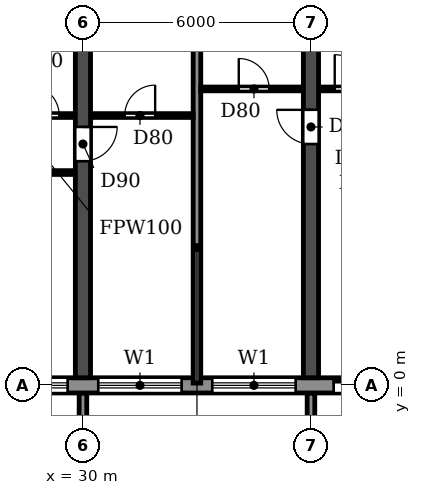
"""IFC4 building model, lengths in metres.
Left out: names, types, materials, properties, quantities, classifications, styles, units other than length and angle.
Written with IfcOpenShell. Run it as: python <this file> out.ifc"""

import sys

from ifc_helpers import new_model, si_unit, direction, frame, frame_2d, origin, place, context, subcontext, project, spatial, polyline, rectangle, outline, extrude, source, transform, mapped, element, fill, save


model = new_model("IFC4")
c1 = context("Model", 3, precision=1e-05, world=origin(), true_north=direction((0.0, 1.0)))
c2 = subcontext(c1, "Body", "Model", "MODEL_VIEW")
j1 = project(units=[si_unit("LENGTHUNIT", "METRE"), si_unit("PLANEANGLEUNIT", "RADIAN")], contexts=[c1])
p1 = place(None, origin())
s1 = spatial("IfcSite", under=j1, at=p1, CompositionType="ELEMENT")
p2 = place(p1, origin())
s2 = spatial("IfcBuilding", under=s1, at=p2, CompositionType="ELEMENT")
p3 = place(p2, frame((0.0, 0.0, 26.7)))
s3 = spatial("IfcBuildingStorey", under=s2, at=p3, CompositionType="ELEMENT", Elevation=26.7)
p4 = place(p3, frame((30.0, 0.2, 0.0), z_axis=(0.0, 0.0, 1.0), x_axis=(0.0, 1.0, 0.0)))
e1 = element("IfcWall", 1, at=p4, inside=s3, PredefinedType="SHEAR", context=c2, shape_type="SweptSolid", body=[
    extrude(rectangle(XDim=11.65, YDim=0.4, at=frame_2d((5.825, 0.0))), origin(), (0.0, 0.0, 1.0), 3.05),
])
p5 = place(p4, frame((5.7, 0.0, 0.0)))
e2 = element("IfcOpeningElement", 2, at=p5, cuts=e1, PredefinedType="OPENING", context=c2, shape_type="SweptSolid", body=[
    extrude(rectangle(XDim=0.9, YDim=2.1, at=frame_2d((0.45, 1.05))), frame((0.0, 0.21, 0.0), z_axis=(0.0, -1.0, 0.0), x_axis=(1.0, 0.0, 0.0)), (0.0, 0.0, 1.0), 0.42),
])
p6 = place(p3, frame((36.0, 0.2, 0.0), z_axis=(0.0, 0.0, 1.0), x_axis=(0.0, 1.0, 0.0)))
e3 = element("IfcWall", 3, at=p6, inside=s3, PredefinedType="SHEAR", context=c2, shape_type="SweptSolid", body=[
    extrude(rectangle(XDim=11.65, YDim=0.4, at=frame_2d((5.825, 0.0))), origin(), (0.0, 0.0, 1.0), 3.05),
])
p7 = place(p6, frame((6.15, 0.0, 0.0)))
e4 = element("IfcOpeningElement", 4, at=p7, cuts=e3, PredefinedType="OPENING", context=c2, shape_type="SweptSolid", body=[
    extrude(rectangle(XDim=0.9, YDim=2.1, at=frame_2d((0.45, 1.05))), frame((0.0, 0.21, 0.0), z_axis=(0.0, -1.0, 0.0), x_axis=(1.0, 0.0, 0.0)), (0.0, 0.0, 1.0), 0.42),
])
p8 = place(p3, frame((4.683, 0.0, 0.0), z_axis=(0.0, 0.0, 1.0), x_axis=(1.0, 0.0, 0.0)))
e5 = element("IfcWall", 5, at=p8, inside=s3, PredefinedType="STANDARD", context=c2, shape_type="SweptSolid", body=[
    extrude(rectangle(XDim=92.634, YDim=0.4, at=frame_2d((46.317, 0.0))), origin(), (0.0, 0.0, 1.0), 3.05),
])
p9 = place(p8, frame((1.717, 0.0, 0.9)))
e6 = element("IfcOpeningElement", 6, at=p9, cuts=e5, PredefinedType="OPENING", context=c2, shape_type="SweptSolid", body=[
    extrude(rectangle(XDim=2.2, YDim=1.5, at=frame_2d((1.1, 0.75))), frame((0.0, 0.21, 0.0), z_axis=(0.0, -1.0, 0.0), x_axis=(1.0, 0.0, 0.0)), (0.0, 0.0, 1.0), 0.42),
])
p10 = place(p8, frame((4.717, 0.0, 0.9)))
e7 = element("IfcOpeningElement", 7, at=p10, cuts=e5, PredefinedType="OPENING", context=c2, shape_type="SweptSolid", body=[
    extrude(rectangle(XDim=2.2, YDim=1.5, at=frame_2d((1.1, 0.75))), frame((0.0, 0.21, 0.0), z_axis=(0.0, -1.0, 0.0), x_axis=(1.0, 0.0, 0.0)), (0.0, 0.0, 1.0), 0.42),
])
p11 = place(p8, frame((7.717, 0.0, 0.9)))
e8 = element("IfcOpeningElement", 8, at=p11, cuts=e5, PredefinedType="OPENING", context=c2, shape_type="SweptSolid", body=[
    extrude(rectangle(XDim=2.2, YDim=1.5, at=frame_2d((1.1, 0.75))), frame((0.0, 0.21, 0.0), z_axis=(0.0, -1.0, 0.0), x_axis=(1.0, 0.0, 0.0)), (0.0, 0.0, 1.0), 0.42),
])
p12 = place(p8, frame((10.717, 0.0, 0.9)))
e9 = element("IfcOpeningElement", 9, at=p12, cuts=e5, PredefinedType="OPENING", context=c2, shape_type="SweptSolid", body=[
    extrude(rectangle(XDim=2.2, YDim=1.5, at=frame_2d((1.1, 0.75))), frame((0.0, 0.21, 0.0), z_axis=(0.0, -1.0, 0.0), x_axis=(1.0, 0.0, 0.0)), (0.0, 0.0, 1.0), 0.42),
])
p13 = place(p8, frame((13.717, 0.0, 0.9)))
e10 = element("IfcOpeningElement", 10, at=p13, cuts=e5, PredefinedType="OPENING", context=c2, shape_type="SweptSolid", body=[
    extrude(rectangle(XDim=2.2, YDim=1.5, at=frame_2d((1.1, 0.75))), frame((0.0, 0.21, 0.0), z_axis=(0.0, -1.0, 0.0), x_axis=(1.0, 0.0, 0.0)), (0.0, 0.0, 1.0), 0.42),
])
p14 = place(p8, frame((16.717, 0.0, 0.9)))
e11 = element("IfcOpeningElement", 11, at=p14, cuts=e5, PredefinedType="OPENING", context=c2, shape_type="SweptSolid", body=[
    extrude(rectangle(XDim=2.2, YDim=1.5, at=frame_2d((1.1, 0.75))), frame((0.0, 0.21, 0.0), z_axis=(0.0, -1.0, 0.0), x_axis=(1.0, 0.0, 0.0)), (0.0, 0.0, 1.0), 0.42),
])
p15 = place(p8, frame((19.917, 0.0, 0.0)))
e12 = element("IfcOpeningElement", 12, at=p15, cuts=e5, PredefinedType="OPENING", context=c2, shape_type="SweptSolid", body=[
    extrude(rectangle(XDim=1.8, YDim=2.4, at=frame_2d((0.9, 1.2))), frame((0.0, 0.21, 0.0), z_axis=(0.0, -1.0, 0.0), x_axis=(1.0, 0.0, 0.0)), (0.0, 0.0, 1.0), 0.42),
])
p16 = place(p8, frame((22.717, 0.0, 0.9)))
e13 = element("IfcOpeningElement", 13, at=p16, cuts=e5, PredefinedType="OPENING", context=c2, shape_type="SweptSolid", body=[
    extrude(rectangle(XDim=2.2, YDim=1.5, at=frame_2d((1.1, 0.75))), frame((0.0, 0.21, 0.0), z_axis=(0.0, -1.0, 0.0), x_axis=(1.0, 0.0, 0.0)), (0.0, 0.0, 1.0), 0.42),
])
p17 = place(p8, frame((25.717, 0.0, 0.9)))
e14 = element("IfcOpeningElement", 14, at=p17, cuts=e5, PredefinedType="OPENING", context=c2, shape_type="SweptSolid", body=[
    extrude(rectangle(XDim=2.2, YDim=1.5, at=frame_2d((1.1, 0.75))), frame((0.0, 0.21, 0.0), z_axis=(0.0, -1.0, 0.0), x_axis=(1.0, 0.0, 0.0)), (0.0, 0.0, 1.0), 0.42),
])
p18 = place(p8, frame((28.717, 0.0, 0.9)))
e15 = element("IfcOpeningElement", 15, at=p18, cuts=e5, PredefinedType="OPENING", context=c2, shape_type="SweptSolid", body=[
    extrude(rectangle(XDim=2.2, YDim=1.5, at=frame_2d((1.1, 0.75))), frame((0.0, 0.21, 0.0), z_axis=(0.0, -1.0, 0.0), x_axis=(1.0, 0.0, 0.0)), (0.0, 0.0, 1.0), 0.42),
])
p19 = place(p8, frame((31.917, 0.0, 0.0)))
e16 = element("IfcOpeningElement", 16, at=p19, cuts=e5, PredefinedType="OPENING", context=c2, shape_type="SweptSolid", body=[
    extrude(rectangle(XDim=1.8, YDim=2.4, at=frame_2d((0.9, 1.2))), frame((0.0, 0.21, 0.0), z_axis=(0.0, -1.0, 0.0), x_axis=(1.0, 0.0, 0.0)), (0.0, 0.0, 1.0), 0.42),
])
p20 = place(p8, frame((34.717, 0.0, 0.9)))
e17 = element("IfcOpeningElement", 17, at=p20, cuts=e5, PredefinedType="OPENING", context=c2, shape_type="SweptSolid", body=[
    extrude(rectangle(XDim=2.2, YDim=1.5, at=frame_2d((1.1, 0.75))), frame((0.0, 0.21, 0.0), z_axis=(0.0, -1.0, 0.0), x_axis=(1.0, 0.0, 0.0)), (0.0, 0.0, 1.0), 0.42),
])
p21 = place(p8, frame((37.717, 0.0, 0.9)))
e18 = element("IfcOpeningElement", 18, at=p21, cuts=e5, PredefinedType="OPENING", context=c2, shape_type="SweptSolid", body=[
    extrude(rectangle(XDim=2.2, YDim=1.5, at=frame_2d((1.1, 0.75))), frame((0.0, 0.21, 0.0), z_axis=(0.0, -1.0, 0.0), x_axis=(1.0, 0.0, 0.0)), (0.0, 0.0, 1.0), 0.42),
])
p22 = place(p8, frame((40.717, 0.0, 0.9)))
e19 = element("IfcOpeningElement", 19, at=p22, cuts=e5, PredefinedType="OPENING", context=c2, shape_type="SweptSolid", body=[
    extrude(rectangle(XDim=2.2, YDim=1.5, at=frame_2d((1.1, 0.75))), frame((0.0, 0.21, 0.0), z_axis=(0.0, -1.0, 0.0), x_axis=(1.0, 0.0, 0.0)), (0.0, 0.0, 1.0), 0.42),
])
p23 = place(p8, frame((43.917, 0.0, 0.0)))
e20 = element("IfcOpeningElement", 20, at=p23, cuts=e5, PredefinedType="OPENING", context=c2, shape_type="SweptSolid", body=[
    extrude(rectangle(XDim=1.8, YDim=2.4, at=frame_2d((0.9, 1.2))), frame((0.0, 0.21, 0.0), z_axis=(0.0, -1.0, 0.0), x_axis=(1.0, 0.0, 0.0)), (0.0, 0.0, 1.0), 0.42),
])
p24 = place(p8, frame((46.717, 0.0, 0.9)))
e21 = element("IfcOpeningElement", 21, at=p24, cuts=e5, PredefinedType="OPENING", context=c2, shape_type="SweptSolid", body=[
    extrude(rectangle(XDim=2.2, YDim=1.5, at=frame_2d((1.1, 0.75))), frame((0.0, 0.21, 0.0), z_axis=(0.0, -1.0, 0.0), x_axis=(1.0, 0.0, 0.0)), (0.0, 0.0, 1.0), 0.42),
])
p25 = place(p8, frame((49.717, 0.0, 0.9)))
e22 = element("IfcOpeningElement", 22, at=p25, cuts=e5, PredefinedType="OPENING", context=c2, shape_type="SweptSolid", body=[
    extrude(rectangle(XDim=2.2, YDim=1.5, at=frame_2d((1.1, 0.75))), frame((0.0, 0.21, 0.0), z_axis=(0.0, -1.0, 0.0), x_axis=(1.0, 0.0, 0.0)), (0.0, 0.0, 1.0), 0.42),
])
p26 = place(p8, frame((52.717, 0.0, 0.9)))
e23 = element("IfcOpeningElement", 23, at=p26, cuts=e5, PredefinedType="OPENING", context=c2, shape_type="SweptSolid", body=[
    extrude(rectangle(XDim=2.2, YDim=1.5, at=frame_2d((1.1, 0.75))), frame((0.0, 0.21, 0.0), z_axis=(0.0, -1.0, 0.0), x_axis=(1.0, 0.0, 0.0)), (0.0, 0.0, 1.0), 0.42),
])
p27 = place(p8, frame((55.717, 0.0, 0.9)))
e24 = element("IfcOpeningElement", 24, at=p27, cuts=e5, PredefinedType="OPENING", context=c2, shape_type="SweptSolid", body=[
    extrude(rectangle(XDim=2.2, YDim=1.5, at=frame_2d((1.1, 0.75))), frame((0.0, 0.21, 0.0), z_axis=(0.0, -1.0, 0.0), x_axis=(1.0, 0.0, 0.0)), (0.0, 0.0, 1.0), 0.42),
])
p28 = place(p8, frame((58.917, 0.0, 0.0)))
e25 = element("IfcOpeningElement", 25, at=p28, cuts=e5, PredefinedType="OPENING", context=c2, shape_type="SweptSolid", body=[
    extrude(rectangle(XDim=1.8, YDim=2.4, at=frame_2d((0.9, 1.2))), frame((0.0, 0.21, 0.0), z_axis=(0.0, -1.0, 0.0), x_axis=(1.0, 0.0, 0.0)), (0.0, 0.0, 1.0), 0.42),
])
p29 = place(p8, frame((61.717, 0.0, 0.9)))
e26 = element("IfcOpeningElement", 26, at=p29, cuts=e5, PredefinedType="OPENING", context=c2, shape_type="SweptSolid", body=[
    extrude(rectangle(XDim=2.2, YDim=1.5, at=frame_2d((1.1, 0.75))), frame((0.0, 0.21, 0.0), z_axis=(0.0, -1.0, 0.0), x_axis=(1.0, 0.0, 0.0)), (0.0, 0.0, 1.0), 0.42),
])
p30 = place(p8, frame((64.717, 0.0, 0.9)))
e27 = element("IfcOpeningElement", 27, at=p30, cuts=e5, PredefinedType="OPENING", context=c2, shape_type="SweptSolid", body=[
    extrude(rectangle(XDim=2.2, YDim=1.5, at=frame_2d((1.1, 0.75))), frame((0.0, 0.21, 0.0), z_axis=(0.0, -1.0, 0.0), x_axis=(1.0, 0.0, 0.0)), (0.0, 0.0, 1.0), 0.42),
])
p31 = place(p8, frame((67.717, 0.0, 0.9)))
e28 = element("IfcOpeningElement", 28, at=p31, cuts=e5, PredefinedType="OPENING", context=c2, shape_type="SweptSolid", body=[
    extrude(rectangle(XDim=2.2, YDim=1.5, at=frame_2d((1.1, 0.75))), frame((0.0, 0.21, 0.0), z_axis=(0.0, -1.0, 0.0), x_axis=(1.0, 0.0, 0.0)), (0.0, 0.0, 1.0), 0.42),
])
p32 = place(p8, frame((70.917, 0.0, 0.0)))
e29 = element("IfcOpeningElement", 29, at=p32, cuts=e5, PredefinedType="OPENING", context=c2, shape_type="SweptSolid", body=[
    extrude(rectangle(XDim=1.8, YDim=2.4, at=frame_2d((0.9, 1.2))), frame((0.0, 0.21, 0.0), z_axis=(0.0, -1.0, 0.0), x_axis=(1.0, 0.0, 0.0)), (0.0, 0.0, 1.0), 0.42),
])
p33 = place(p8, frame((73.717, 0.0, 0.9)))
e30 = element("IfcOpeningElement", 30, at=p33, cuts=e5, PredefinedType="OPENING", context=c2, shape_type="SweptSolid", body=[
    extrude(rectangle(XDim=2.2, YDim=1.5, at=frame_2d((1.1, 0.75))), frame((0.0, 0.21, 0.0), z_axis=(0.0, -1.0, 0.0), x_axis=(1.0, 0.0, 0.0)), (0.0, 0.0, 1.0), 0.42),
])
p34 = place(p8, frame((76.717, 0.0, 0.9)))
e31 = element("IfcOpeningElement", 31, at=p34, cuts=e5, PredefinedType="OPENING", context=c2, shape_type="SweptSolid", body=[
    extrude(rectangle(XDim=2.2, YDim=1.5, at=frame_2d((1.1, 0.75))), frame((0.0, 0.21, 0.0), z_axis=(0.0, -1.0, 0.0), x_axis=(1.0, 0.0, 0.0)), (0.0, 0.0, 1.0), 0.42),
])
p35 = place(p8, frame((79.717, 0.0, 0.9)))
e32 = element("IfcOpeningElement", 32, at=p35, cuts=e5, PredefinedType="OPENING", context=c2, shape_type="SweptSolid", body=[
    extrude(rectangle(XDim=2.2, YDim=1.5, at=frame_2d((1.1, 0.75))), frame((0.0, 0.21, 0.0), z_axis=(0.0, -1.0, 0.0), x_axis=(1.0, 0.0, 0.0)), (0.0, 0.0, 1.0), 0.42),
])
p36 = place(p8, frame((82.717, 0.0, 0.9)))
e33 = element("IfcOpeningElement", 33, at=p36, cuts=e5, PredefinedType="OPENING", context=c2, shape_type="SweptSolid", body=[
    extrude(rectangle(XDim=2.2, YDim=1.5, at=frame_2d((1.1, 0.75))), frame((0.0, 0.21, 0.0), z_axis=(0.0, -1.0, 0.0), x_axis=(1.0, 0.0, 0.0)), (0.0, 0.0, 1.0), 0.42),
])
p37 = place(p8, frame((85.717, 0.0, 0.9)))
e34 = element("IfcOpeningElement", 34, at=p37, cuts=e5, PredefinedType="OPENING", context=c2, shape_type="SweptSolid", body=[
    extrude(rectangle(XDim=2.2, YDim=1.5, at=frame_2d((1.1, 0.75))), frame((0.0, 0.21, 0.0), z_axis=(0.0, -1.0, 0.0), x_axis=(1.0, 0.0, 0.0)), (0.0, 0.0, 1.0), 0.42),
])
p38 = place(p8, frame((88.717, 0.0, 0.9)))
e35 = element("IfcOpeningElement", 35, at=p38, cuts=e5, PredefinedType="OPENING", context=c2, shape_type="SweptSolid", body=[
    extrude(rectangle(XDim=2.2, YDim=1.5, at=frame_2d((1.1, 0.75))), frame((0.0, 0.21, 0.0), z_axis=(0.0, -1.0, 0.0), x_axis=(1.0, 0.0, 0.0)), (0.0, 0.0, 1.0), 0.42),
])
m1 = source(origin(), c2, "Body", "SweptSolid", [
    extrude(outline(polyline([(0.0, 0.0), (0.2, 0.0), (0.2, 1.65), (0.0, 1.65), (0.0, 0.0)])), origin(), (0.0, 0.0, 1.0), 3.1),
])
for number, where in (
    (36, (29.9, -1.85, 0.0)),
    (37, (35.9, -1.85, 0.0)),
):
    element("IfcWall", number, at=place(p3, frame(where)), inside=s3, PredefinedType="STANDARD", context=c2, shape_type="MappedRepresentation", body=[
        mapped(m1, transform((0.0, 0.0, 0.0))),
    ])
p39 = place(p3, frame((33.0, 0.06, 0.0), z_axis=(0.0, 0.0, 1.0), x_axis=(0.0, 1.0, 0.0)))
e38 = element("IfcWall", 38, at=p39, inside=s3, PredefinedType="PARTITIONING", context=c2, shape_type="SweptSolid", body=[
    extrude(rectangle(XDim=11.78, YDim=0.2, at=frame_2d((5.89, 0.0))), origin(), (0.0, 0.0, 1.0), 3.05),
])
p40 = place(p3, frame((26.95, 5.6, 0.0), z_axis=(0.0, 0.0, 1.0), x_axis=(1.0, 0.0, 0.0)))
e39 = element("IfcWall", 39, at=p40, inside=s3, PredefinedType="PARTITIONING", context=c2, shape_type="SweptSolid", body=[
    extrude(rectangle(XDim=2.84, YDim=0.1, at=frame_2d((1.42, 0.0))), origin(), (0.0, 0.0, 1.0), 3.05),
])
p41 = place(p40, frame((0.55, 0.0, 0.0)))
e40 = element("IfcOpeningElement", 40, at=p41, cuts=e39, PredefinedType="OPENING", context=c2, shape_type="SweptSolid", body=[
    extrude(rectangle(XDim=0.9, YDim=2.1, at=frame_2d((0.45, 1.05))), frame((0.0, 0.06, 0.0), z_axis=(0.0, -1.0, 0.0), x_axis=(1.0, 0.0, 0.0)), (0.0, 0.0, 1.0), 0.12),
])
p42 = place(p3, frame((27.9, 7.1, 0.0), z_axis=(0.0, 0.0, 1.0), x_axis=(1.0, 0.0, 0.0)))
e41 = element("IfcWall", 41, at=p42, inside=s3, PredefinedType="PARTITIONING", context=c2, shape_type="SweptSolid", body=[
    extrude(rectangle(XDim=1.89, YDim=0.1, at=frame_2d((0.945, 0.0))), origin(), (0.0, 0.0, 1.0), 3.05),
])
p43 = place(p42, frame((0.675, 0.0, 0.0)))
e42 = element("IfcOpeningElement", 42, at=p43, cuts=e41, PredefinedType="OPENING", context=c2, shape_type="SweptSolid", body=[
    extrude(rectangle(XDim=0.8, YDim=2.1, at=frame_2d((0.4, 1.05))), frame((0.0, 0.06, 0.0), z_axis=(0.0, -1.0, 0.0), x_axis=(1.0, 0.0, 0.0)), (0.0, 0.0, 1.0), 0.12),
])
p44 = place(p3, frame((30.21, 7.1, 0.0), z_axis=(0.0, 0.0, 1.0), x_axis=(1.0, 0.0, 0.0)))
e43 = element("IfcWall", 43, at=p44, inside=s3, PredefinedType="PARTITIONING", context=c2, shape_type="SweptSolid", body=[
    extrude(rectangle(XDim=2.69, YDim=0.1, at=frame_2d((1.345, 0.0))), origin(), (0.0, 0.0, 1.0), 3.05),
])
p45 = place(p44, frame((0.89, 0.0, 0.0)))
e44 = element("IfcOpeningElement", 44, at=p45, cuts=e43, PredefinedType="OPENING", context=c2, shape_type="SweptSolid", body=[
    extrude(rectangle(XDim=0.8, YDim=2.1, at=frame_2d((0.4, 1.05))), frame((0.0, 0.06, 0.0), z_axis=(0.0, -1.0, 0.0), x_axis=(1.0, 0.0, 0.0)), (0.0, 0.0, 1.0), 0.12),
])
p46 = place(p3, frame((33.1, 7.8, 0.0), z_axis=(0.0, 0.0, 1.0), x_axis=(1.0, 0.0, 0.0)))
e45 = element("IfcWall", 45, at=p46, inside=s3, PredefinedType="PARTITIONING", context=c2, shape_type="SweptSolid", body=[
    extrude(rectangle(XDim=2.69, YDim=0.1, at=frame_2d((1.345, 0.0))), origin(), (0.0, 0.0, 1.0), 3.05),
])
p47 = place(p46, frame((1.0, 0.0, 0.0)))
e46 = element("IfcOpeningElement", 46, at=p47, cuts=e45, PredefinedType="OPENING", context=c2, shape_type="SweptSolid", body=[
    extrude(rectangle(XDim=0.8, YDim=2.1, at=frame_2d((0.4, 1.05))), frame((0.0, 0.06, 0.0), z_axis=(0.0, -1.0, 0.0), x_axis=(1.0, 0.0, 0.0)), (0.0, 0.0, 1.0), 0.12),
])
p48 = place(p3, frame((36.21, 7.8, 0.0), z_axis=(0.0, 0.0, 1.0), x_axis=(1.0, 0.0, 0.0)))
e47 = element("IfcWall", 47, at=p48, inside=s3, PredefinedType="PARTITIONING", context=c2, shape_type="SweptSolid", body=[
    extrude(rectangle(XDim=1.99, YDim=0.1, at=frame_2d((0.995, 0.0))), origin(), (0.0, 0.0, 1.0), 3.05),
])
p49 = place(p48, frame((0.415, 0.0, 0.0)))
e48 = element("IfcOpeningElement", 48, at=p49, cuts=e47, PredefinedType="OPENING", context=c2, shape_type="SweptSolid", body=[
    extrude(rectangle(XDim=0.9, YDim=2.1, at=frame_2d((0.45, 1.05))), frame((0.0, 0.06, 0.0), z_axis=(0.0, -1.0, 0.0), x_axis=(1.0, 0.0, 0.0)), (0.0, 0.0, 1.0), 0.12),
])
p50 = place(p16, origin())
e49 = element("IfcWindow", 49, at=p50, inside=s3, PartitioningType="DOUBLE_PANEL_HORIZONTAL", PredefinedType="WINDOW", context=c2, shape_type="SweptSolid", body=[
    extrude(rectangle(XDim=2.2, YDim=1.5, at=frame_2d((1.1, 0.75))), frame((0.0, 0.03, 0.0), z_axis=(0.0, -1.0, 0.0), x_axis=(1.0, 0.0, 0.0)), (0.0, 0.0, 1.0), 0.06),
])
fill(e13, e49)
p51 = place(p17, origin())
e50 = element("IfcWindow", 50, at=p51, inside=s3, PartitioningType="DOUBLE_PANEL_HORIZONTAL", PredefinedType="WINDOW", context=c2, shape_type="SweptSolid", body=[
    extrude(rectangle(XDim=2.2, YDim=1.5, at=frame_2d((1.1, 0.75))), frame((0.0, 0.03, 0.0), z_axis=(0.0, -1.0, 0.0), x_axis=(1.0, 0.0, 0.0)), (0.0, 0.0, 1.0), 0.06),
])
fill(e14, e50)
p52 = place(p18, origin())
e51 = element("IfcWindow", 51, at=p52, inside=s3, PartitioningType="DOUBLE_PANEL_HORIZONTAL", PredefinedType="WINDOW", context=c2, shape_type="SweptSolid", body=[
    extrude(rectangle(XDim=2.2, YDim=1.5, at=frame_2d((1.1, 0.75))), frame((0.0, 0.03, 0.0), z_axis=(0.0, -1.0, 0.0), x_axis=(1.0, 0.0, 0.0)), (0.0, 0.0, 1.0), 0.06),
])
fill(e15, e51)
p53 = place(p19, origin())
e52 = element("IfcDoor", 52, at=p53, inside=s3, OperationType="DOUBLE_DOOR_SLIDING", PredefinedType="DOOR", context=c2, shape_type="SweptSolid", body=[
    extrude(rectangle(XDim=1.8, YDim=2.4, at=frame_2d((0.9, 1.2))), frame((0.0, 0.025, 0.0), z_axis=(0.0, -1.0, 0.0), x_axis=(1.0, 0.0, 0.0)), (0.0, 0.0, 1.0), 0.05),
])
fill(e16, e52)
p54 = place(p45, origin())
e53 = element("IfcDoor", 53, at=p54, inside=s3, OperationType="SINGLE_SWING_RIGHT", PredefinedType="DOOR", context=c2, shape_type="SweptSolid", body=[
    extrude(rectangle(XDim=0.8, YDim=2.1, at=frame_2d((0.4, 1.05))), frame((0.0, 0.025, 0.0), z_axis=(0.0, -1.0, 0.0), x_axis=(1.0, 0.0, 0.0)), (0.0, 0.0, 1.0), 0.05),
])
fill(e44, e53)
p55 = place(p43, origin())
e54 = element("IfcDoor", 54, at=p55, inside=s3, OperationType="SINGLE_SWING_LEFT", PredefinedType="DOOR", context=c2, shape_type="SweptSolid", body=[
    extrude(rectangle(XDim=0.8, YDim=2.1, at=frame_2d((0.4, 1.05))), frame((0.0, 0.025, 0.0), z_axis=(0.0, -1.0, 0.0), x_axis=(1.0, 0.0, 0.0)), (0.0, 0.0, 1.0), 0.05),
])
fill(e42, e54)
p56 = place(p5, frame((0.9, 0.0, 0.0), z_axis=(0.0, 0.0, 1.0), x_axis=(-1.0, 0.0, 0.0)))
e55 = element("IfcDoor", 55, at=p56, inside=s3, OperationType="SINGLE_SWING_LEFT", PredefinedType="DOOR", context=c2, shape_type="SweptSolid", body=[
    extrude(rectangle(XDim=0.9, YDim=2.1, at=frame_2d((0.45, 1.05))), frame((0.0, 0.025, 0.0), z_axis=(0.0, -1.0, 0.0), x_axis=(1.0, 0.0, 0.0)), (0.0, 0.0, 1.0), 0.05),
])
fill(e2, e55)
p57 = place(p47, origin())
e56 = element("IfcDoor", 56, at=p57, inside=s3, OperationType="SINGLE_SWING_LEFT", PredefinedType="DOOR", context=c2, shape_type="SweptSolid", body=[
    extrude(rectangle(XDim=0.8, YDim=2.1, at=frame_2d((0.4, 1.05))), frame((0.0, 0.025, 0.0), z_axis=(0.0, -1.0, 0.0), x_axis=(1.0, 0.0, 0.0)), (0.0, 0.0, 1.0), 0.05),
])
fill(e46, e56)
p58 = place(p7, origin())
e57 = element("IfcDoor", 57, at=p58, inside=s3, OperationType="SINGLE_SWING_RIGHT", PredefinedType="DOOR", context=c2, shape_type="SweptSolid", body=[
    extrude(rectangle(XDim=0.9, YDim=2.1, at=frame_2d((0.45, 1.05))), frame((0.0, 0.025, 0.0), z_axis=(0.0, -1.0, 0.0), x_axis=(1.0, 0.0, 0.0)), (0.0, 0.0, 1.0), 0.05),
])
fill(e4, e57)
p59 = place(p49, origin())
e58 = element("IfcDoor", 58, at=p59, inside=s3, OperationType="SINGLE_SWING_LEFT", PredefinedType="DOOR", context=c2, shape_type="SweptSolid", body=[
    extrude(rectangle(XDim=0.9, YDim=2.1, at=frame_2d((0.45, 1.05))), frame((0.0, 0.025, 0.0), z_axis=(0.0, -1.0, 0.0), x_axis=(1.0, 0.0, 0.0)), (0.0, 0.0, 1.0), 0.05),
])
fill(e48, e58)
save(model, sys.argv[1])
